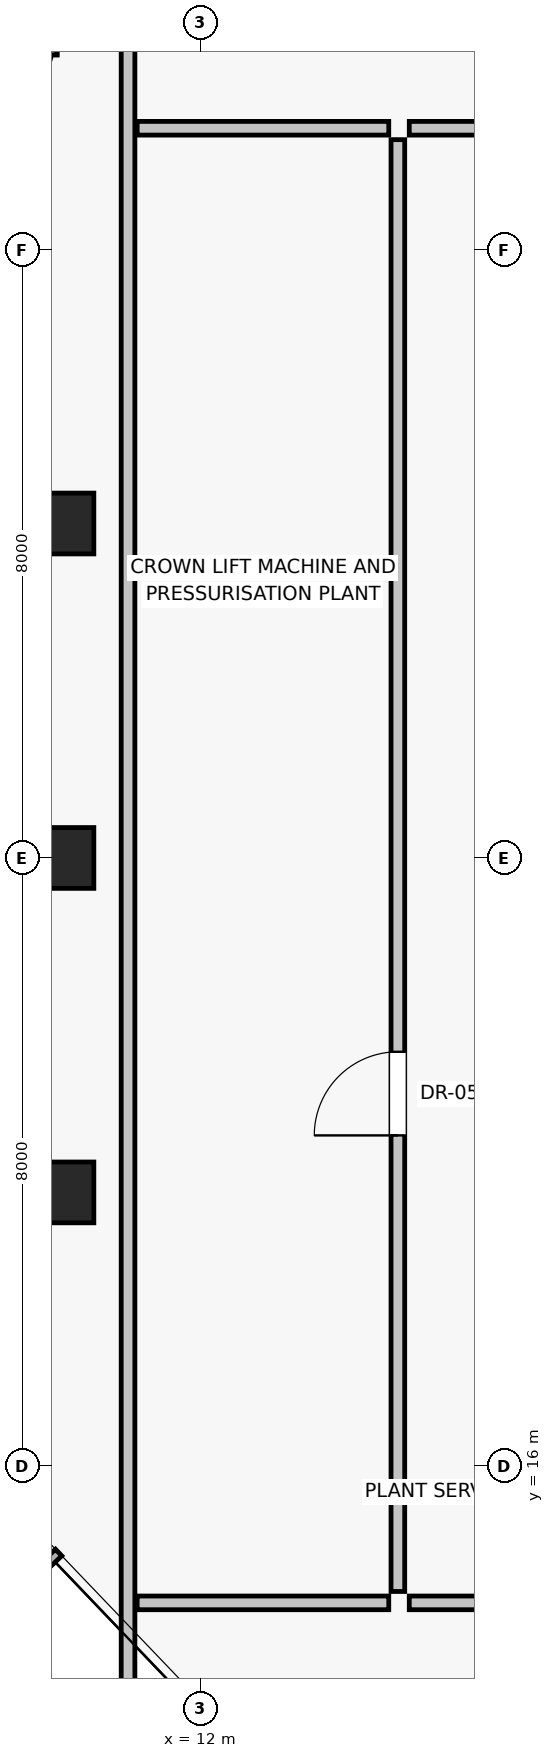
"""IFC4 building model, lengths in metres.
Left out: names, types, materials, properties, quantities, classifications, styles, units other than length and angle.
Written with IfcOpenShell. Run it as: python <this file> out.ifc"""

import sys

from ifc_helpers import new_model, si_unit, direction, frame, frame_2d, origin, origin_2d, place, context, subcontext, project, spatial, rectangle, extrude, source, transform, mapped, element, fill, save


model = new_model("IFC4")
c1 = context("Model", 3, precision=1e-05, world=origin(), true_north=direction((0.0, 1.0)))
c2 = subcontext(c1, "Body", "Model", "MODEL_VIEW")
j1 = project(units=[si_unit("LENGTHUNIT", "METRE"), si_unit("PLANEANGLEUNIT", "RADIAN")], contexts=[c1])
p1 = place(None, origin())
s1 = spatial("IfcSite", under=j1, at=p1, CompositionType="ELEMENT")
p2 = place(p1, origin())
s2 = spatial("IfcBuilding", under=s1, at=p2, CompositionType="ELEMENT")
p3 = place(p2, frame((0.0, 0.0, 264.25)))
s3 = spatial("IfcBuildingStorey", under=s2, at=p3, CompositionType="ELEMENT", Elevation=264.25)
for number, where, z_axis, x_axis in (
    (1, (10.2, 28.4, 0.0), (0.0, 0.0, 1.0), (1.0, 0.0, 0.0)),
    (2, (10.2, 24.0, 0.0), (0.0, 0.0, 1.0), (1.0, 0.0, 0.0)),
    (3, (10.2, 19.6, 0.0), (0.0, 0.0, 1.0), (1.0, 0.0, 0.0)),
):
    element("IfcColumn", number, at=place(p3, frame(where, z_axis=z_axis, x_axis=x_axis)), inside=s3, PredefinedType="COLUMN", context=c2, shape_type="SweptSolid", body=[
        extrude(rectangle(XDim=0.8, YDim=0.8, at=origin_2d()), origin(), (0.0, 0.0, 1.0), 4.65),
    ])
p4 = place(p3, frame((14.75, 14.2, 0.0), z_axis=(0.0, 0.0, 1.0), x_axis=(1.0, 0.0, 0.0)))
e4 = element("IfcWall", 4, at=p4, inside=s3, PredefinedType="PARTITIONING", context=c2, shape_type="SweptSolid", body=[
    extrude(rectangle(XDim=18.5, YDim=0.18, at=frame_2d((9.25, 0.0))), origin(), (0.0, 0.0, 1.0), 4.39),
])
p5 = place(p4, frame((6.0, 0.0, 0.0)))
e5 = element("IfcOpeningElement", 5, at=p5, cuts=e4, PredefinedType="OPENING", context=c2, shape_type="SweptSolid", body=[
    extrude(rectangle(XDim=1.1, YDim=2.03, at=frame_2d((0.55, 1.015))), frame((0.0, 0.1, 0.0), z_axis=(0.0, -1.0, 0.0), x_axis=(1.0, 0.0, 0.0)), (0.0, 0.0, 1.0), 0.2),
])
p6 = place(p3, frame((14.75, 33.6, 0.0), z_axis=(0.0, 0.0, 1.0), x_axis=(1.0, 0.0, 0.0)))
e6 = element("IfcWall", 6, at=p6, inside=s3, PredefinedType="PARTITIONING", context=c2, shape_type="SweptSolid", body=[
    extrude(rectangle(XDim=18.5, YDim=0.18, at=frame_2d((9.25, 0.0))), origin(), (0.0, 0.0, 1.0), 4.39),
])
p7 = place(p6, frame((6.0, 0.0, 0.0)))
e7 = element("IfcOpeningElement", 7, at=p7, cuts=e6, PredefinedType="OPENING", context=c2, shape_type="SweptSolid", body=[
    extrude(rectangle(XDim=1.1, YDim=2.03, at=frame_2d((0.55, 1.015))), frame((0.0, 0.1, 0.0), z_axis=(0.0, -1.0, 0.0), x_axis=(1.0, 0.0, 0.0)), (0.0, 0.0, 1.0), 0.2),
])
p8 = place(p3, frame((14.6, 14.35, 0.0), z_axis=(0.0, 0.0, 1.0), x_axis=(0.0, 1.0, 0.0)))
e8 = element("IfcWall", 8, at=p8, inside=s3, PredefinedType="PARTITIONING", context=c2, shape_type="SweptSolid", body=[
    extrude(rectangle(XDim=19.1, YDim=0.18, at=frame_2d((9.55, 0.0))), origin(), (0.0, 0.0, 1.0), 4.39),
])
p9 = place(p8, frame((6.0, 0.0, 0.0)))
e9 = element("IfcOpeningElement", 9, at=p9, cuts=e8, PredefinedType="OPENING", context=c2, shape_type="SweptSolid", body=[
    extrude(rectangle(XDim=1.1, YDim=2.03, at=frame_2d((0.55, 1.015))), frame((0.0, 0.1, 0.0), z_axis=(0.0, -1.0, 0.0), x_axis=(1.0, 0.0, 0.0)), (0.0, 0.0, 1.0), 0.2),
])
p10 = place(p3, frame((11.05, 11.17, 0.0), z_axis=(0.0, 0.0, 1.0), x_axis=(0.0, 1.0, 0.0)))
e10 = element("IfcWall", 10, at=p10, inside=s3, PredefinedType="PARTITIONING", context=c2, shape_type="SweptSolid", body=[
    extrude(rectangle(XDim=25.66, YDim=0.18, at=frame_2d((12.83, 0.0))), origin(), (0.0, 0.0, 1.0), 2.19),
])
for number, where, z_axis, x_axis in (
    (11, (11.17, 14.2, 0.0), (0.0, 0.0, 1.0), (1.0, 0.0, 0.0)),
    (12, (11.17, 33.6, 0.0), (0.0, 0.0, 1.0), (1.0, 0.0, 0.0)),
):
    element("IfcWall", number, at=place(p3, frame(where, z_axis=z_axis, x_axis=x_axis)), inside=s3, PredefinedType="PARTITIONING", context=c2, shape_type="SweptSolid", body=[
        extrude(rectangle(XDim=3.31, YDim=0.18, at=frame_2d((1.655, 0.0))), origin(), (0.0, 0.0, 1.0), 4.39),
    ])
m1 = source(origin(), c2, "Body", "SweptSolid", [
    extrude(rectangle(XDim=1.1, YDim=2.03, at=frame_2d((0.55, 1.015))), frame((0.0, 0.025, 0.0), z_axis=(0.0, -1.0, 0.0), x_axis=(1.0, 0.0, 0.0)), (0.0, 0.0, 1.0), 0.05),
])
p11 = place(p9, origin())
e13 = element("IfcDoor", 13, at=p11, inside=s3, OperationType="SINGLE_SWING_LEFT", PredefinedType="DOOR", context=c2, shape_type="MappedRepresentation", body=[
    mapped(m1, transform((0.0, 0.0, 0.0), scale=1.0)),
])
fill(e9, e13)
save(model, sys.argv[1])
